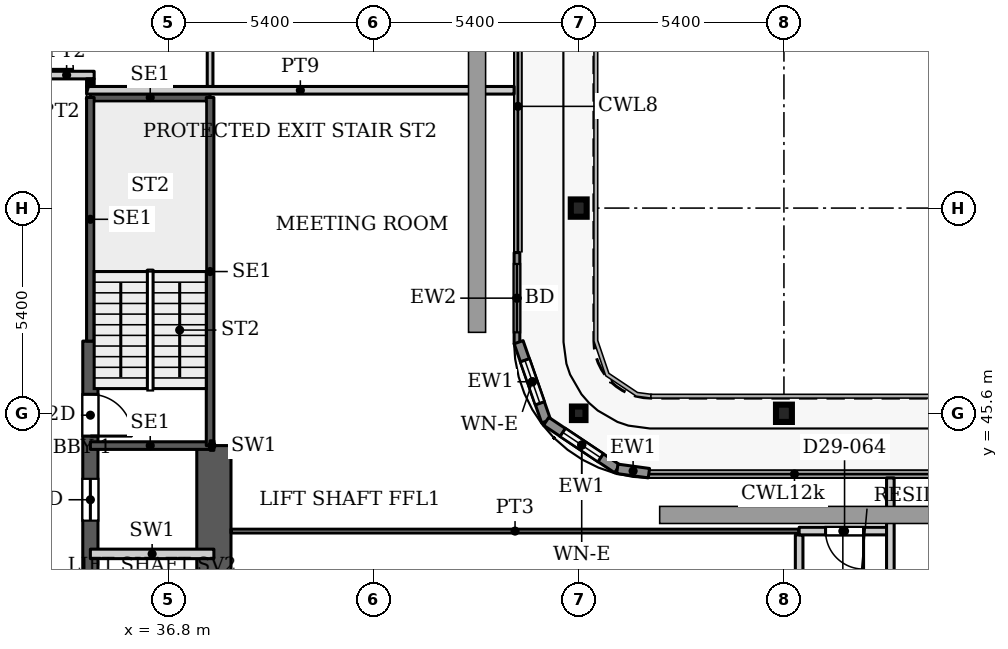
"""IFC4 building model, lengths in metres.
Left out: names, types, materials, properties, quantities, classifications, styles, units other than length and angle.
Written with IfcOpenShell. Run it as: python <this file> out.ifc"""

import sys

from ifc_helpers import new_model, si_unit, direction, frame, frame_2d, origin, origin_2d, place, context, subcontext, project, spatial, rectangle, hollow_rectangle, i_section, extrude, source, transform, mapped, element, fill, save


model = new_model("IFC4")
c1 = context("Model", 3, precision=1e-05, world=origin(), true_north=direction((0.0, 1.0)))
c2 = subcontext(c1, "Body", "Model", "MODEL_VIEW")
j1 = project(units=[si_unit("LENGTHUNIT", "METRE"), si_unit("PLANEANGLEUNIT", "RADIAN")], contexts=[c1])
p1 = place(None, origin())
s1 = spatial("IfcSite", under=j1, at=p1, CompositionType="ELEMENT")
p2 = place(p1, origin())
s2 = spatial("IfcBuilding", under=s1, at=p2, CompositionType="ELEMENT")
p3 = place(p2, frame((0.0, 0.0, 125.3)))
s3 = spatial("IfcBuildingStorey", under=s2, at=p3, CompositionType="ELEMENT", Elevation=125.3)
for number, where, z_axis, x_axis in (
    (1, (53.0, 45.6, 0.0), (0.0, 0.0, 1.0), (1.0, 0.0, 0.0)),
    (2, (47.6, 51.0, 0.0), (0.0, 0.0, 1.0), (1.0, 0.0, 0.0)),
):
    element("IfcColumn", number, at=place(p3, frame(where, z_axis=z_axis, x_axis=x_axis)), inside=s3, PredefinedType="COLUMN", context=c2, shape_type="SweptSolid", body=[
        extrude(i_section(OverallWidth=0.418, OverallDepth=0.455, WebThickness=0.042, FlangeThickness=0.068, FilletRadius=0.014, at=origin_2d()), origin(), (0.0, 0.0, 1.0), 3.9),
    ])
p4 = place(p3, frame((47.6, 45.6, 0.0), z_axis=(0.0, 0.0, 1.0), x_axis=(1.0, 0.0, 0.0)))
e3 = element("IfcColumn", 3, at=p4, inside=s3, PredefinedType="COLUMN", context=c2, shape_type="SweptSolid", body=[
    extrude(hollow_rectangle(XDim=0.356, YDim=0.356, WallThickness=0.016, InnerFilletRadius=0.016, OuterFilletRadius=0.032, at=origin_2d()), origin(), (0.0, 0.0, 1.0), 3.9),
])
p5 = place(p3, frame((34.75, 29.05, 0.0), z_axis=(0.0, 0.0, 1.0), x_axis=(0.0, 1.0, 0.0)))
e4 = element("IfcWall", 4, at=p5, inside=s3, PredefinedType="SHEAR", context=c2, shape_type="SweptSolid", body=[
    extrude(rectangle(XDim=18.45, YDim=0.4, at=frame_2d((9.225, 0.0))), origin(), (0.0, 0.0, 1.0), 3.9),
])
p6 = place(p5, frame((8.025, 0.0, 0.0)))
e5 = element("IfcOpeningElement", 5, at=p6, cuts=e4, PredefinedType="OPENING", context=c2, shape_type="SweptSolid", body=[
    extrude(rectangle(XDim=1.1, YDim=2.2, at=frame_2d((0.55, 1.1))), frame((0.0, 0.21, 0.0), z_axis=(0.0, -1.0, 0.0), x_axis=(1.0, 0.0, 0.0)), (0.0, 0.0, 1.0), 0.42),
])
p7 = place(p5, frame((10.875, 0.0, 0.0)))
e6 = element("IfcOpeningElement", 6, at=p7, cuts=e4, PredefinedType="OPENING", context=c2, shape_type="SweptSolid", body=[
    extrude(rectangle(XDim=1.1, YDim=2.2, at=frame_2d((0.55, 1.1))), frame((0.0, 0.21, 0.0), z_axis=(0.0, -1.0, 0.0), x_axis=(1.0, 0.0, 0.0)), (0.0, 0.0, 1.0), 0.42),
])
p8 = place(p5, frame((13.725, 0.0, 0.0)))
e7 = element("IfcOpeningElement", 7, at=p8, cuts=e4, PredefinedType="OPENING", context=c2, shape_type="SweptSolid", body=[
    extrude(rectangle(XDim=1.1, YDim=2.2, at=frame_2d((0.55, 1.1))), frame((0.0, 0.21, 0.0), z_axis=(0.0, -1.0, 0.0), x_axis=(1.0, 0.0, 0.0)), (0.0, 0.0, 1.0), 0.42),
])
p9 = place(p5, frame((15.95, 0.0, 0.0)))
e8 = element("IfcOpeningElement", 8, at=p9, cuts=e4, PredefinedType="OPENING", context=c2, shape_type="SweptSolid", body=[
    extrude(rectangle(XDim=1.1, YDim=2.2, at=frame_2d((0.55, 1.1))), frame((0.0, 0.21, 0.0), z_axis=(0.0, -1.0, 0.0), x_axis=(1.0, 0.0, 0.0)), (0.0, 0.0, 1.0), 0.42),
])
p10 = place(p3, frame((38.0, 36.2, 0.0), z_axis=(0.0, 0.0, 1.0), x_axis=(0.0, 1.0, 0.0)))
e9 = element("IfcWall", 9, at=p10, inside=s3, PredefinedType="SHEAR", context=c2, shape_type="SweptSolid", body=[
    extrude(rectangle(XDim=8.55, YDim=0.9, at=frame_2d((4.275, 0.0))), origin(), (0.0, 0.0, 1.0), 3.9),
])
p11 = place(p3, frame((45.975, 49.83, 0.0), z_axis=(0.0, 0.0, 1.0), x_axis=(0.0, -1.0, 0.0)))
e10 = element("IfcWall", 10, at=p11, inside=s3, PredefinedType="SOLIDWALL", context=c2, shape_type="SweptSolid", body=[
    extrude(rectangle(XDim=2.4, YDim=0.15, at=frame_2d((1.2, 0.0))), origin(), (0.0, 0.0, 1.0), 3.75),
])
p12 = place(p11, frame((0.3, 0.0, 0.0)))
e11 = element("IfcOpeningElement", 11, at=p12, cuts=e10, PredefinedType="OPENING", context=c2, shape_type="SweptSolid", body=[
    extrude(rectangle(XDim=1.8, YDim=2.4, at=frame_2d((0.9, 1.2))), frame((0.0, 0.085, 0.0), z_axis=(0.0, -1.0, 0.0), x_axis=(1.0, 0.0, 0.0)), (0.0, 0.0, 1.0), 0.17),
])
p13 = place(p3, frame((46.018, 47.471, 0.0), z_axis=(0.0, 0.0, 1.0), x_axis=(0.328791208903, -0.944402637093, 0.0)))
e12 = element("IfcWall", 12, at=p13, inside=s3, PredefinedType="SOLIDWALL", context=c2, shape_type="SweptSolid", body=[
    extrude(rectangle(XDim=2.205, YDim=0.25, at=frame_2d((1.102, 0.0))), origin(), (0.0, 0.0, 1.0), 3.75),
])
p14 = place(p13, frame((0.503, 0.0, 0.6)))
e13 = element("IfcOpeningElement", 13, at=p14, cuts=e12, PredefinedType="OPENING", context=c2, shape_type="SweptSolid", body=[
    extrude(rectangle(XDim=1.2, YDim=2.1, at=frame_2d((0.6, 1.05))), frame((0.0, 0.135, 0.0), z_axis=(0.0, -1.0, 0.0), x_axis=(1.0, 0.0, 0.0)), (0.0, 0.0, 1.0), 0.27),
])
p15 = place(p3, frame((46.743, 45.389, 0.0), z_axis=(0.0, 0.0, 1.0), x_axis=(0.831449265529, -0.555600682912, 0.0)))
e14 = element("IfcWall", 14, at=p15, inside=s3, PredefinedType="SOLIDWALL", context=c2, shape_type="SweptSolid", body=[
    extrude(rectangle(XDim=2.251, YDim=0.25, at=frame_2d((1.126, 0.0))), origin(), (0.0, 0.0, 1.0), 3.75),
])
p16 = place(p15, frame((0.525, 0.0, 0.6)))
e15 = element("IfcOpeningElement", 15, at=p16, cuts=e14, PredefinedType="OPENING", context=c2, shape_type="SweptSolid", body=[
    extrude(rectangle(XDim=1.2, YDim=2.1, at=frame_2d((0.6, 1.05))), frame((0.0, 0.135, 0.0), z_axis=(0.0, -1.0, 0.0), x_axis=(1.0, 0.0, 0.0)), (0.0, 0.0, 1.0), 0.27),
])
p17 = place(p3, frame((48.615, 44.138, 0.0), z_axis=(0.0, 0.0, 1.0), x_axis=(0.990741504246, -0.135761819977, 0.0)))
e16 = element("IfcWall", 16, at=p17, inside=s3, PredefinedType="SOLIDWALL", context=c2, shape_type="SweptSolid", body=[
    extrude(rectangle(XDim=0.84, YDim=0.25, at=frame_2d((0.42, 0.0))), origin(), (0.0, 0.0, 1.0), 3.75),
])
for number, where, z_axis, x_axis in (
    (17, (34.75, 44.75, 0.0), (0.0, 0.0, 1.0), (1.0, 0.0, 0.0)),
    (18, (34.75, 53.91, 0.0), (0.0, 0.0, 1.0), (1.0, 0.0, 0.0)),
):
    element("IfcWall", number, at=place(p3, frame(where, z_axis=z_axis, x_axis=x_axis)), inside=s3, PredefinedType="SHEAR", context=c2, shape_type="SweptSolid", body=[
        extrude(rectangle(XDim=3.15, YDim=0.2, at=frame_2d((1.575, 0.0))), origin(), (0.0, 0.0, 1.0), 3.9),
    ])
p18 = place(p3, frame((34.75, 47.5, 0.0), z_axis=(0.0, 0.0, 1.0), x_axis=(0.0, 1.0, 0.0)))
e19 = element("IfcWall", 19, at=p18, inside=s3, PredefinedType="SHEAR", context=c2, shape_type="SweptSolid", body=[
    extrude(rectangle(XDim=6.41, YDim=0.2, at=frame_2d((3.205, 0.0))), origin(), (0.0, 0.0, 1.0), 3.9),
])
p19 = place(p3, frame((37.9, 44.75, 0.0), z_axis=(0.0, 0.0, 1.0), x_axis=(0.0, 1.0, 0.0)))
e20 = element("IfcWall", 20, at=p19, inside=s3, PredefinedType="SHEAR", context=c2, shape_type="SweptSolid", body=[
    extrude(rectangle(XDim=9.16, YDim=0.2, at=frame_2d((4.58, 0.0))), origin(), (0.0, 0.0, 1.0), 3.9),
])
p20 = place(p3, frame((34.75, 41.9, 0.0), z_axis=(0.0, 0.0, 1.0), x_axis=(1.0, 0.0, 0.0)))
e21 = element("IfcWall", 21, at=p20, inside=s3, PredefinedType="PARTITIONING", context=c2, shape_type="SweptSolid", body=[
    extrude(rectangle(XDim=3.25, YDim=0.25, at=frame_2d((1.625, 0.0))), origin(), (0.0, 0.0, 1.0), 3.9),
])
p21 = place(p3, frame((37.9, 44.75, 0.0), z_axis=(0.0, 0.0, 1.0), x_axis=(1.0, 0.0, 0.0)))
e22 = element("IfcWall", 22, at=p21, inside=s3, PredefinedType="PARTITIONING", context=c2, shape_type="SweptSolid", body=[
    extrude(rectangle(XDim=0.1, YDim=0.25, at=frame_2d((0.05, 0.0))), origin(), (0.0, 0.0, 1.0), 3.9),
])
p22 = place(p3, frame((33.4, 54.5, 0.0), z_axis=(0.0, 0.0, 1.0), x_axis=(1.0, 0.0, 0.0)))
e23 = element("IfcWall", 23, at=p22, inside=s3, PredefinedType="PARTITIONING", context=c2, shape_type="SweptSolid", body=[
    extrude(rectangle(XDim=1.45, YDim=0.2, at=frame_2d((0.725, 0.0))), origin(), (0.0, 0.0, 1.0), 3.6),
])
p23 = place(p3, frame((34.65, 54.1, 0.0), z_axis=(0.0, 0.0, 1.0), x_axis=(1.0, 0.0, 0.0)))
e24 = element("IfcWall", 24, at=p23, inside=s3, PredefinedType="PARTITIONING", context=c2, shape_type="SweptSolid", body=[
    extrude(rectangle(XDim=11.25, YDim=0.2, at=frame_2d((5.625, 0.0))), origin(), (0.0, 0.0, 1.0), 3.6),
])
p24 = place(p3, frame((34.75, 54.2, 0.0), z_axis=(0.0, 0.0, 1.0), x_axis=(0.0, 1.0, 0.0)))
e25 = element("IfcWall", 25, at=p24, inside=s3, PredefinedType="PARTITIONING", context=c2, shape_type="SweptSolid", body=[
    extrude(rectangle(XDim=0.2, YDim=0.2, at=frame_2d((0.1, 0.0))), origin(), (0.0, 0.0, 1.0), 3.6),
])
p25 = place(p3, frame((37.9, 54.2, 0.0), z_axis=(0.0, 0.0, 1.0), x_axis=(0.0, 1.0, 0.0)))
e26 = element("IfcWall", 26, at=p25, inside=s3, PredefinedType="PARTITIONING", context=c2, shape_type="SweptSolid", body=[
    extrude(rectangle(XDim=9.4, YDim=0.15, at=frame_2d((4.7, 0.0))), origin(), (0.0, 0.0, 1.0), 3.6),
])
p26 = place(p25, frame((7.1, 0.0, 0.0)))
e27 = element("IfcOpeningElement", 27, at=p26, cuts=e26, PredefinedType="OPENING", context=c2, shape_type="SweptSolid", body=[
    extrude(rectangle(XDim=0.9, YDim=2.1, at=frame_2d((0.45, 1.05))), frame((0.0, 0.085, 0.0), z_axis=(0.0, -1.0, 0.0), x_axis=(1.0, 0.0, 0.0)), (0.0, 0.0, 1.0), 0.17),
])
p27 = place(p25, frame((2.25, 0.0, 0.0)))
e28 = element("IfcOpeningElement", 28, at=p27, cuts=e26, PredefinedType="OPENING", context=c2, shape_type="SweptSolid", body=[
    extrude(rectangle(XDim=1.0, YDim=2.1, at=frame_2d((0.5, 1.05))), frame((0.0, 0.085, 0.0), z_axis=(0.0, -1.0, 0.0), x_axis=(1.0, 0.0, 0.0)), (0.0, 0.0, 1.0), 0.17),
])
p28 = place(p3, frame((38.449, 42.5, 0.0), z_axis=(0.0, 0.0, 1.0), x_axis=(1.0, 0.0, 0.0)))
e29 = element("IfcWall", 29, at=p28, inside=s3, PredefinedType="PARTITIONING", context=c2, shape_type="SweptSolid", body=[
    extrude(rectangle(XDim=14.951, YDim=0.1, at=frame_2d((7.476, 0.0))), origin(), (0.0, 0.0, 1.0), 3.6),
])
p29 = place(p3, frame((53.4, 36.199, 0.0), z_axis=(0.0, 0.0, 1.0), x_axis=(0.0, 1.0, 0.0)))
e30 = element("IfcWall", 30, at=p29, inside=s3, PredefinedType="PARTITIONING", context=c2, shape_type="SweptSolid", body=[
    extrude(rectangle(XDim=6.201, YDim=0.2, at=frame_2d((3.101, 0.0))), origin(), (0.0, 0.0, 1.0), 3.6),
])
p30 = place(p29, frame((3.707, 0.0, 0.0)))
e31 = element("IfcOpeningElement", 31, at=p30, cuts=e30, PredefinedType="OPENING", context=c2, shape_type="SweptSolid", body=[
    extrude(rectangle(XDim=1.0, YDim=2.1, at=frame_2d((0.5, 1.05))), frame((0.0, 0.11, 0.0), z_axis=(0.0, -1.0, 0.0), x_axis=(1.0, 0.0, 0.0)), (0.0, 0.0, 1.0), 0.22),
])
p31 = place(p3, frame((53.4, 42.5, 0.0), z_axis=(0.0, 0.0, 1.0), x_axis=(1.0, 0.0, 0.0)))
e32 = element("IfcWall", 32, at=p31, inside=s3, PredefinedType="PARTITIONING", context=c2, shape_type="SweptSolid", body=[
    extrude(rectangle(XDim=2.3, YDim=0.2, at=frame_2d((1.15, 0.0))), origin(), (0.0, 0.0, 1.0), 3.6),
])
p32 = place(p31, frame((0.695, 0.0, 0.0)))
e33 = element("IfcOpeningElement", 33, at=p32, cuts=e32, PredefinedType="OPENING", context=c2, shape_type="SweptSolid", body=[
    extrude(rectangle(XDim=1.0, YDim=2.1, at=frame_2d((0.5, 1.05))), frame((0.0, 0.11, 0.0), z_axis=(0.0, -1.0, 0.0), x_axis=(1.0, 0.0, 0.0)), (0.0, 0.0, 1.0), 0.22),
])
p33 = place(p3, frame((55.8, 30.4, 0.0), z_axis=(0.0, 0.0, 1.0), x_axis=(0.0, 1.0, 0.0)))
e34 = element("IfcWall", 34, at=p33, inside=s3, PredefinedType="PARTITIONING", context=c2, shape_type="SweptSolid", body=[
    extrude(rectangle(XDim=13.5, YDim=0.2, at=frame_2d((6.75, 0.0))), origin(), (0.0, 0.0, 1.0), 3.6),
])
m1 = source(origin(), c2, "Body", "SweptSolid", [
    extrude(rectangle(XDim=1.8, YDim=2.4, at=frame_2d((0.9, 1.2))), frame((0.0, 0.025, 0.0), z_axis=(0.0, -1.0, 0.0), x_axis=(1.0, 0.0, 0.0)), (0.0, 0.0, 1.0), 0.05),
])
p34 = place(p12, origin())
e35 = element("IfcDoor", 35, at=p34, inside=s3, OperationType="SLIDING_TO_LEFT", PredefinedType="DOOR", context=c2, shape_type="MappedRepresentation", body=[
    mapped(m1, transform((0.0, 0.0, 0.0), x_axis=(1.0, 0.0, 0.0), y_axis=(0.0, 1.0, 0.0), z_axis=(0.0, 0.0, 1.0), scale=1.0)),
])
fill(e11, e35)
m2 = source(origin(), c2, "Body", "SweptSolid", [
    extrude(rectangle(XDim=1.2, YDim=2.1, at=frame_2d((0.6, 1.05))), frame((0.0, 0.03, 0.0), z_axis=(0.0, -1.0, 0.0), x_axis=(1.0, 0.0, 0.0)), (0.0, 0.0, 1.0), 0.06),
])
p35 = place(p14, origin())
e36 = element("IfcWindow", 36, at=p35, inside=s3, PartitioningType="SINGLE_PANEL", PredefinedType="WINDOW", context=c2, shape_type="MappedRepresentation", body=[
    mapped(m2, transform((0.0, 0.0, 0.0), x_axis=(1.0, 0.0, 0.0), y_axis=(0.0, 1.0, 0.0), z_axis=(0.0, 0.0, 1.0), scale=1.0)),
])
fill(e13, e36)
p36 = place(p16, origin())
e37 = element("IfcWindow", 37, at=p36, inside=s3, PartitioningType="SINGLE_PANEL", PredefinedType="WINDOW", context=c2, shape_type="MappedRepresentation", body=[
    mapped(m2, transform((0.0, 0.0, 0.0), x_axis=(1.0, 0.0, 0.0), y_axis=(0.0, 1.0, 0.0), z_axis=(0.0, 0.0, 1.0), scale=1.0)),
])
fill(e15, e37)
m3 = source(origin(), c2, "Body", "SweptSolid", [
    extrude(rectangle(XDim=1.1, YDim=2.2, at=frame_2d((0.55, 1.1))), frame((0.0, 0.025, 0.0), z_axis=(0.0, -1.0, 0.0), x_axis=(1.0, 0.0, 0.0)), (0.0, 0.0, 1.0), 0.05),
])
p37 = place(p8, origin())
e38 = element("IfcDoor", 38, at=p37, inside=s3, OperationType="SLIDING_TO_LEFT", PredefinedType="DOOR", context=c2, shape_type="MappedRepresentation", body=[
    mapped(m3, transform((0.0, 0.0, 0.0), x_axis=(1.0, 0.0, 0.0), y_axis=(0.0, 1.0, 0.0), z_axis=(0.0, 0.0, 1.0), scale=1.0)),
])
fill(e7, e38)
m4 = source(origin(), c2, "Body", "SweptSolid", [
    extrude(rectangle(XDim=1.1, YDim=2.2, at=frame_2d((0.55, 1.1))), frame((0.0, 0.025, 0.0), z_axis=(0.0, -1.0, 0.0), x_axis=(1.0, 0.0, 0.0)), (0.0, 0.0, 1.0), 0.05),
])
p38 = place(p9, origin())
e39 = element("IfcDoor", 39, at=p38, inside=s3, OperationType="SINGLE_SWING_RIGHT", PredefinedType="DOOR", context=c2, shape_type="MappedRepresentation", body=[
    mapped(m4, transform((0.0, 0.0, 0.0), x_axis=(1.0, 0.0, 0.0), y_axis=(0.0, 1.0, 0.0), z_axis=(0.0, 0.0, 1.0), scale=1.0)),
])
fill(e8, e39)
m5 = source(origin(), c2, "Body", "SweptSolid", [
    extrude(rectangle(XDim=1.0, YDim=2.1, at=frame_2d((0.5, 1.05))), frame((0.0, 0.025, 0.0), z_axis=(0.0, -1.0, 0.0), x_axis=(1.0, 0.0, 0.0)), (0.0, 0.0, 1.0), 0.05),
])
p39 = place(p32, origin())
e40 = element("IfcDoor", 40, at=p39, inside=s3, OperationType="SINGLE_SWING_RIGHT", PredefinedType="DOOR", context=c2, shape_type="MappedRepresentation", body=[
    mapped(m5, transform((0.0, 0.0, 0.0), x_axis=(1.0, 0.0, 0.0), y_axis=(0.0, 1.0, 0.0), z_axis=(0.0, 0.0, 1.0), scale=1.0)),
])
fill(e33, e40)
save(model, sys.argv[1])
